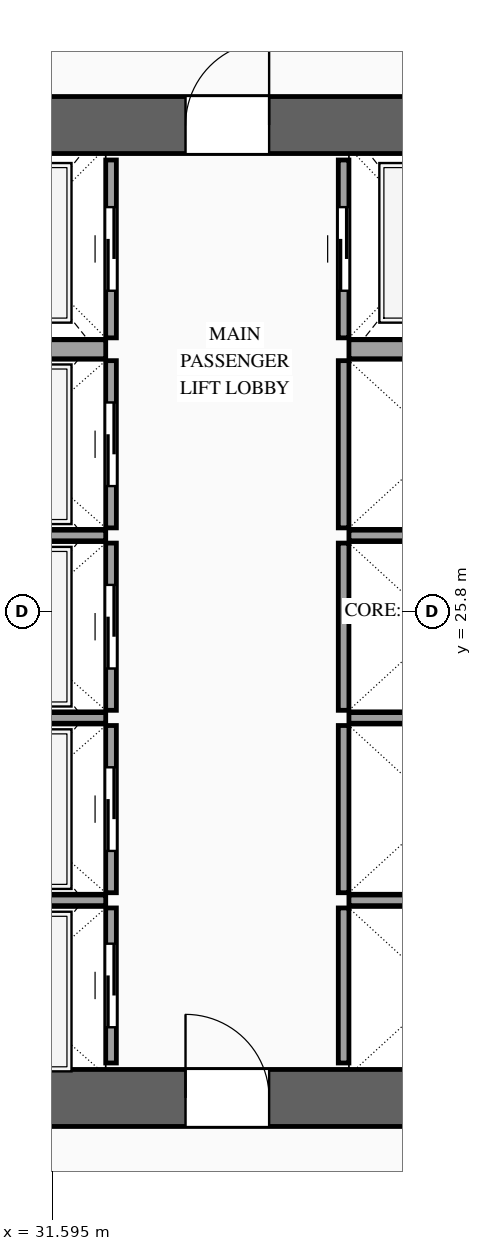
"""IFC4 building model, lengths in metres.
Left out: names, types, materials, properties, quantities, classifications, styles, units other than length and angle.
Written with IfcOpenShell. Run it as: python <this file> out.ifc"""

import sys

from ifc_helpers import new_model, si_unit, direction, frame, frame_2d, origin, place, context, subcontext, project, spatial, rectangle, extrude, source, transform, mapped, element, fill, save


model = new_model("IFC4")
c1 = context("Model", 3, precision=1e-05, world=origin(), true_north=direction((0.0, 1.0)))
c2 = subcontext(c1, "Body", "Model", "MODEL_VIEW")
j1 = project(units=[si_unit("LENGTHUNIT", "METRE"), si_unit("PLANEANGLEUNIT", "RADIAN")], contexts=[c1])
p1 = place(None, origin())
s1 = spatial("IfcSite", under=j1, at=p1, CompositionType="ELEMENT")
p2 = place(p1, origin())
s2 = spatial("IfcBuilding", under=s1, at=p2, CompositionType="ELEMENT")
p3 = place(p2, frame((0.0, 0.0, 129.8)))
s3 = spatial("IfcBuildingStorey", under=s2, at=p3, CompositionType="ELEMENT", Elevation=129.8)
p4 = place(p3, frame((23.425, 19.4, 0.0), z_axis=(0.0, 0.0, 1.0), x_axis=(1.0, 0.0, 0.0)))
e1 = element("IfcWall", 1, at=p4, inside=s3, PredefinedType="SHEAR", context=c2, shape_type="SweptSolid", body=[
    extrude(rectangle(XDim=27.15, YDim=0.75, at=frame_2d((13.575, 0.0))), origin(), (0.0, 0.0, 1.0), 4.6),
])
p5 = place(p4, frame((2.025, 0.0, 0.0)))
e2 = element("IfcOpeningElement", 2, at=p5, cuts=e1, PredefinedType="OPENING", context=c2, shape_type="SweptSolid", body=[
    extrude(rectangle(XDim=1.1, YDim=2.2, at=frame_2d((0.55, 1.1))), frame((0.0, 0.39, 0.0), z_axis=(0.0, -1.0, 0.0), x_axis=(1.0, 0.0, 0.0)), (0.0, 0.0, 1.0), 0.78),
])
p6 = place(p4, frame((9.925, 0.0, 0.0)))
e3 = element("IfcOpeningElement", 3, at=p6, cuts=e1, PredefinedType="OPENING", context=c2, shape_type="SweptSolid", body=[
    extrude(rectangle(XDim=1.1, YDim=2.2, at=frame_2d((0.55, 1.1))), frame((0.0, 0.39, 0.0), z_axis=(0.0, -1.0, 0.0), x_axis=(1.0, 0.0, 0.0)), (0.0, 0.0, 1.0), 0.78),
])
p7 = place(p4, frame((23.125, 0.0, 0.0)))
e4 = element("IfcOpeningElement", 4, at=p7, cuts=e1, PredefinedType="OPENING", context=c2, shape_type="SweptSolid", body=[
    extrude(rectangle(XDim=1.1, YDim=2.2, at=frame_2d((0.55, 1.1))), frame((0.0, 0.39, 0.0), z_axis=(0.0, -1.0, 0.0), x_axis=(1.0, 0.0, 0.0)), (0.0, 0.0, 1.0), 0.78),
])
p8 = place(p4, frame((19.745, 0.0, 0.0)))
e5 = element("IfcOpeningElement", 5, at=p8, cuts=e1, PredefinedType="OPENING", context=c2, shape_type="SweptSolid", body=[
    extrude(rectangle(XDim=0.9, YDim=2.15, at=frame_2d((0.45, 1.075))), frame((0.0, 0.39, 0.0), z_axis=(0.0, -1.0, 0.0), x_axis=(1.0, 0.0, 0.0)), (0.0, 0.0, 1.0), 0.78),
])
p9 = place(p3, frame((23.425, 32.2, 0.0), z_axis=(0.0, 0.0, 1.0), x_axis=(1.0, 0.0, 0.0)))
e6 = element("IfcWall", 6, at=p9, inside=s3, PredefinedType="SHEAR", context=c2, shape_type="SweptSolid", body=[
    extrude(rectangle(XDim=27.15, YDim=0.75, at=frame_2d((13.575, 0.0))), origin(), (0.0, 0.0, 1.0), 4.6),
])
p10 = place(p9, frame((4.645, 0.0, 0.0)))
e7 = element("IfcOpeningElement", 7, at=p10, cuts=e6, PredefinedType="OPENING", context=c2, shape_type="SweptSolid", body=[
    extrude(rectangle(XDim=0.9, YDim=2.15, at=frame_2d((0.45, 1.075))), frame((0.0, 0.39, 0.0), z_axis=(0.0, -1.0, 0.0), x_axis=(1.0, 0.0, 0.0)), (0.0, 0.0, 1.0), 0.78),
])
p11 = place(p9, frame((9.925, 0.0, 0.0)))
e8 = element("IfcOpeningElement", 8, at=p11, cuts=e6, PredefinedType="OPENING", context=c2, shape_type="SweptSolid", body=[
    extrude(rectangle(XDim=1.1, YDim=2.2, at=frame_2d((0.55, 1.1))), frame((0.0, 0.39, 0.0), z_axis=(0.0, -1.0, 0.0), x_axis=(1.0, 0.0, 0.0)), (0.0, 0.0, 1.0), 0.78),
])
p12 = place(p9, frame((15.775, 0.0, 0.0)))
e9 = element("IfcOpeningElement", 9, at=p12, cuts=e6, PredefinedType="OPENING", context=c2, shape_type="SweptSolid", body=[
    extrude(rectangle(XDim=1.1, YDim=2.2, at=frame_2d((0.55, 1.1))), frame((0.0, 0.39, 0.0), z_axis=(0.0, -1.0, 0.0), x_axis=(1.0, 0.0, 0.0)), (0.0, 0.0, 1.0), 0.78),
])
p13 = place(p9, frame((18.975, 0.0, 0.0)))
e10 = element("IfcOpeningElement", 10, at=p13, cuts=e6, PredefinedType="OPENING", context=c2, shape_type="SweptSolid", body=[
    extrude(rectangle(XDim=0.9, YDim=2.15, at=frame_2d((0.45, 1.075))), frame((0.0, 0.39, 0.0), z_axis=(0.0, -1.0, 0.0), x_axis=(1.0, 0.0, 0.0)), (0.0, 0.0, 1.0), 0.78),
])
p14 = place(p3, frame((32.37, 19.86, 0.0), z_axis=(0.0, 0.0, 1.0), x_axis=(0.0, 1.0, 0.0)))
e11 = element("IfcWall", 11, at=p14, inside=s3, PredefinedType="SOLIDWALL", context=c2, shape_type="SweptSolid", body=[
    extrude(rectangle(XDim=2.04, YDim=0.14, at=frame_2d((1.02, 0.0))), origin(), (0.0, 0.0, 1.0), 4.38),
])
p15 = place(p14, frame((0.47, 0.0, 0.0)))
e12 = element("IfcOpeningElement", 12, at=p15, cuts=e11, PredefinedType="OPENING", context=c2, shape_type="SweptSolid", body=[
    extrude(rectangle(XDim=1.1, YDim=2.2, at=frame_2d((0.55, 1.1))), frame((0.0, 0.085, 0.0), z_axis=(0.0, -1.0, 0.0), x_axis=(1.0, 0.0, 0.0)), (0.0, 0.0, 1.0), 0.17),
])
m1 = source(origin(), c2, "Body", "SweptSolid", [
    extrude(rectangle(XDim=2.5, YDim=0.14, at=frame_2d((1.25, 0.0))), origin(), (0.0, 0.0, 1.0), 4.38),
])
p16 = place(p3, frame((29.8, 22.0, 0.0), z_axis=(0.0, 0.0, 1.0), x_axis=(1.0, 0.0, 0.0)))
e13 = element("IfcWall", 13, at=p16, inside=s3, PredefinedType="SOLIDWALL", context=c2, shape_type="MappedRepresentation", body=[
    mapped(m1, transform((0.0, 0.0, 0.0), scale=1.0)),
])
p17 = place(p3, frame((32.37, 22.1, 0.0), z_axis=(0.0, 0.0, 1.0), x_axis=(0.0, 1.0, 0.0)))
e14 = element("IfcWall", 14, at=p17, inside=s3, PredefinedType="SOLIDWALL", context=c2, shape_type="SweptSolid", body=[
    extrude(rectangle(XDim=2.2, YDim=0.14, at=frame_2d((1.1, 0.0))), origin(), (0.0, 0.0, 1.0), 4.38),
])
p18 = place(p17, frame((0.55, 0.0, 0.0)))
e15 = element("IfcOpeningElement", 15, at=p18, cuts=e14, PredefinedType="OPENING", context=c2, shape_type="SweptSolid", body=[
    extrude(rectangle(XDim=1.1, YDim=2.2, at=frame_2d((0.55, 1.1))), frame((0.0, 0.085, 0.0), z_axis=(0.0, -1.0, 0.0), x_axis=(1.0, 0.0, 0.0)), (0.0, 0.0, 1.0), 0.17),
])
p19 = place(p3, frame((29.8, 24.4, 0.0), z_axis=(0.0, 0.0, 1.0), x_axis=(1.0, 0.0, 0.0)))
e16 = element("IfcWall", 16, at=p19, inside=s3, PredefinedType="SOLIDWALL", context=c2, shape_type="MappedRepresentation", body=[
    mapped(m1, transform((0.0, 0.0, 0.0), scale=1.0)),
])
p20 = place(p3, frame((32.37, 24.5, 0.0), z_axis=(0.0, 0.0, 1.0), x_axis=(0.0, 1.0, 0.0)))
e17 = element("IfcWall", 17, at=p20, inside=s3, PredefinedType="SOLIDWALL", context=c2, shape_type="SweptSolid", body=[
    extrude(rectangle(XDim=2.2, YDim=0.14, at=frame_2d((1.1, 0.0))), origin(), (0.0, 0.0, 1.0), 4.38),
])
p21 = place(p20, frame((0.55, 0.0, 0.0)))
e18 = element("IfcOpeningElement", 18, at=p21, cuts=e17, PredefinedType="OPENING", context=c2, shape_type="SweptSolid", body=[
    extrude(rectangle(XDim=1.1, YDim=2.2, at=frame_2d((0.55, 1.1))), frame((0.0, 0.085, 0.0), z_axis=(0.0, -1.0, 0.0), x_axis=(1.0, 0.0, 0.0)), (0.0, 0.0, 1.0), 0.17),
])
p22 = place(p3, frame((29.8, 26.8, 0.0), z_axis=(0.0, 0.0, 1.0), x_axis=(1.0, 0.0, 0.0)))
e19 = element("IfcWall", 19, at=p22, inside=s3, PredefinedType="SOLIDWALL", context=c2, shape_type="MappedRepresentation", body=[
    mapped(m1, transform((0.0, 0.0, 0.0), scale=1.0)),
])
p23 = place(p3, frame((32.37, 26.9, 0.0), z_axis=(0.0, 0.0, 1.0), x_axis=(0.0, 1.0, 0.0)))
e20 = element("IfcWall", 20, at=p23, inside=s3, PredefinedType="SOLIDWALL", context=c2, shape_type="SweptSolid", body=[
    extrude(rectangle(XDim=2.2, YDim=0.14, at=frame_2d((1.1, 0.0))), origin(), (0.0, 0.0, 1.0), 4.38),
])
p24 = place(p23, frame((0.55, 0.0, 0.0)))
e21 = element("IfcOpeningElement", 21, at=p24, cuts=e20, PredefinedType="OPENING", context=c2, shape_type="SweptSolid", body=[
    extrude(rectangle(XDim=1.1, YDim=2.2, at=frame_2d((0.55, 1.1))), frame((0.0, 0.085, 0.0), z_axis=(0.0, -1.0, 0.0), x_axis=(1.0, 0.0, 0.0)), (0.0, 0.0, 1.0), 0.17),
])
p25 = place(p3, frame((32.37, 29.4, 0.0), z_axis=(0.0, 0.0, 1.0), x_axis=(0.0, 1.0, 0.0)))
e22 = element("IfcWall", 22, at=p25, inside=s3, PredefinedType="SOLIDWALL", context=c2, shape_type="SweptSolid", body=[
    extrude(rectangle(XDim=2.34, YDim=0.14, at=frame_2d((1.17, 0.0))), origin(), (0.0, 0.0, 1.0), 4.38),
])
p26 = place(p25, frame((0.62, 0.0, 0.0)))
e23 = element("IfcOpeningElement", 23, at=p26, cuts=e22, PredefinedType="OPENING", context=c2, shape_type="SweptSolid", body=[
    extrude(rectangle(XDim=1.1, YDim=2.2, at=frame_2d((0.55, 1.1))), frame((0.0, 0.085, 0.0), z_axis=(0.0, -1.0, 0.0), x_axis=(1.0, 0.0, 0.0)), (0.0, 0.0, 1.0), 0.17),
])
m2 = source(origin(), c2, "Body", "SweptSolid", [
    extrude(rectangle(XDim=2.5, YDim=0.25, at=frame_2d((1.25, 0.0))), origin(), (0.0, 0.0, 1.0), 4.38),
])
p27 = place(p3, frame((29.8, 29.25, 0.0), z_axis=(0.0, 0.0, 1.0), x_axis=(1.0, 0.0, 0.0)))
e24 = element("IfcWall", 24, at=p27, inside=s3, PredefinedType="SOLIDWALL", context=c2, shape_type="MappedRepresentation", body=[
    mapped(m2, transform((0.0, 0.0, 0.0), scale=1.0)),
])
m3 = source(origin(), c2, "Body", "SweptSolid", [
    extrude(rectangle(XDim=2.04, YDim=0.14, at=frame_2d((1.02, 0.0))), origin(), (0.0, 0.0, 1.0), 4.38),
])
p28 = place(p3, frame((35.43, 19.86, 0.0), z_axis=(0.0, 0.0, 1.0), x_axis=(0.0, 1.0, 0.0)))
e25 = element("IfcWall", 25, at=p28, inside=s3, PredefinedType="SOLIDWALL", context=c2, shape_type="MappedRepresentation", body=[
    mapped(m3, transform((0.0, 0.0, 0.0), scale=1.0)),
])
m4 = source(origin(), c2, "Body", "SweptSolid", [
    extrude(rectangle(XDim=2.4, YDim=0.14, at=frame_2d((1.2, 0.0))), origin(), (0.0, 0.0, 1.0), 4.38),
])
p29 = place(p3, frame((35.5, 22.0, 0.0), z_axis=(0.0, 0.0, 1.0), x_axis=(1.0, 0.0, 0.0)))
e26 = element("IfcWall", 26, at=p29, inside=s3, PredefinedType="SOLIDWALL", context=c2, shape_type="MappedRepresentation", body=[
    mapped(m4, transform((0.0, 0.0, 0.0), scale=1.0)),
])
m5 = source(origin(), c2, "Body", "SweptSolid", [
    extrude(rectangle(XDim=2.2, YDim=0.14, at=frame_2d((1.1, 0.0))), origin(), (0.0, 0.0, 1.0), 4.38),
])
p30 = place(p3, frame((35.43, 22.1, 0.0), z_axis=(0.0, 0.0, 1.0), x_axis=(0.0, 1.0, 0.0)))
e27 = element("IfcWall", 27, at=p30, inside=s3, PredefinedType="SOLIDWALL", context=c2, shape_type="MappedRepresentation", body=[
    mapped(m5, transform((0.0, 0.0, 0.0), scale=1.0)),
])
p31 = place(p3, frame((35.5, 24.4, 0.0), z_axis=(0.0, 0.0, 1.0), x_axis=(1.0, 0.0, 0.0)))
e28 = element("IfcWall", 28, at=p31, inside=s3, PredefinedType="SOLIDWALL", context=c2, shape_type="MappedRepresentation", body=[
    mapped(m4, transform((0.0, 0.0, 0.0), scale=1.0)),
])
p32 = place(p3, frame((35.43, 24.5, 0.0), z_axis=(0.0, 0.0, 1.0), x_axis=(0.0, 1.0, 0.0)))
e29 = element("IfcWall", 29, at=p32, inside=s3, PredefinedType="SOLIDWALL", context=c2, shape_type="MappedRepresentation", body=[
    mapped(m5, transform((0.0, 0.0, 0.0), scale=1.0)),
])
p33 = place(p3, frame((35.5, 26.8, 0.0), z_axis=(0.0, 0.0, 1.0), x_axis=(1.0, 0.0, 0.0)))
e30 = element("IfcWall", 30, at=p33, inside=s3, PredefinedType="SOLIDWALL", context=c2, shape_type="MappedRepresentation", body=[
    mapped(m4, transform((0.0, 0.0, 0.0), scale=1.0)),
])
m6 = source(origin(), c2, "Body", "SweptSolid", [
    extrude(rectangle(XDim=2.2, YDim=0.14, at=frame_2d((1.1, 0.0))), origin(), (0.0, 0.0, 1.0), 4.38),
])
p34 = place(p3, frame((35.43, 26.9, 0.0), z_axis=(0.0, 0.0, 1.0), x_axis=(0.0, 1.0, 0.0)))
e31 = element("IfcWall", 31, at=p34, inside=s3, PredefinedType="SOLIDWALL", context=c2, shape_type="MappedRepresentation", body=[
    mapped(m6, transform((0.0, 0.0, 0.0), scale=1.0)),
])
p35 = place(p3, frame((35.43, 29.4, 0.0), z_axis=(0.0, 0.0, 1.0), x_axis=(0.0, 1.0, 0.0)))
e32 = element("IfcWall", 32, at=p35, inside=s3, PredefinedType="SOLIDWALL", context=c2, shape_type="SweptSolid", body=[
    extrude(rectangle(XDim=2.34, YDim=0.14, at=frame_2d((1.17, 0.0))), origin(), (0.0, 0.0, 1.0), 4.38),
])
p36 = place(p35, frame((0.62, 0.0, 0.0)))
e33 = element("IfcOpeningElement", 33, at=p36, cuts=e32, PredefinedType="OPENING", context=c2, shape_type="SweptSolid", body=[
    extrude(rectangle(XDim=1.1, YDim=2.2, at=frame_2d((0.55, 1.1))), frame((0.0, 0.085, 0.0), z_axis=(0.0, -1.0, 0.0), x_axis=(1.0, 0.0, 0.0)), (0.0, 0.0, 1.0), 0.17),
])
m7 = source(origin(), c2, "Body", "SweptSolid", [
    extrude(rectangle(XDim=2.4, YDim=0.25, at=frame_2d((1.2, 0.0))), origin(), (0.0, 0.0, 1.0), 4.38),
])
p37 = place(p3, frame((35.5, 29.25, 0.0), z_axis=(0.0, 0.0, 1.0), x_axis=(1.0, 0.0, 0.0)))
e34 = element("IfcWall", 34, at=p37, inside=s3, PredefinedType="SOLIDWALL", context=c2, shape_type="MappedRepresentation", body=[
    mapped(m7, transform((0.0, 0.0, 0.0), scale=1.0)),
])
m8 = source(origin(), c2, "Body", "SweptSolid", [
    extrude(rectangle(XDim=1.1, YDim=2.2, at=frame_2d((0.55, 1.1))), frame((0.0, 0.025, 0.0), z_axis=(0.0, -1.0, 0.0), x_axis=(1.0, 0.0, 0.0)), (0.0, 0.0, 1.0), 0.05),
])
p38 = place(p15, origin())
e35 = element("IfcDoor", 35, at=p38, inside=s3, OperationType="SLIDING_TO_LEFT", PredefinedType="DOOR", context=c2, shape_type="MappedRepresentation", body=[
    mapped(m8, transform((0.0, 0.0, 0.0), scale=1.0)),
])
fill(e12, e35)
p39 = place(p18, origin())
e36 = element("IfcDoor", 36, at=p39, inside=s3, OperationType="SLIDING_TO_RIGHT", PredefinedType="DOOR", context=c2, shape_type="MappedRepresentation", body=[
    mapped(m8, transform((0.0, 0.0, 0.0), scale=1.0)),
])
fill(e15, e36)
p40 = place(p21, origin())
e37 = element("IfcDoor", 37, at=p40, inside=s3, OperationType="SLIDING_TO_LEFT", PredefinedType="DOOR", context=c2, shape_type="MappedRepresentation", body=[
    mapped(m8, transform((0.0, 0.0, 0.0), scale=1.0)),
])
fill(e18, e37)
p41 = place(p24, origin())
e38 = element("IfcDoor", 38, at=p41, inside=s3, OperationType="SLIDING_TO_RIGHT", PredefinedType="DOOR", context=c2, shape_type="MappedRepresentation", body=[
    mapped(m8, transform((0.0, 0.0, 0.0), scale=1.0)),
])
fill(e21, e38)
p42 = place(p26, origin())
e39 = element("IfcDoor", 39, at=p42, inside=s3, OperationType="SLIDING_TO_LEFT", PredefinedType="DOOR", context=c2, shape_type="MappedRepresentation", body=[
    mapped(m8, transform((0.0, 0.0, 0.0), scale=1.0)),
])
fill(e23, e39)
p43 = place(p36, origin())
e40 = element("IfcDoor", 40, at=p43, inside=s3, OperationType="SLIDING_TO_RIGHT", PredefinedType="DOOR", context=c2, shape_type="MappedRepresentation", body=[
    mapped(m8, transform((0.0, 0.0, 0.0), scale=1.0)),
])
fill(e33, e40)
m9 = source(origin(), c2, "Body", "SweptSolid", [
    extrude(rectangle(XDim=1.1, YDim=2.2, at=frame_2d((0.55, 1.1))), frame((0.0, 0.025, 0.0), z_axis=(0.0, -1.0, 0.0), x_axis=(1.0, 0.0, 0.0)), (0.0, 0.0, 1.0), 0.05),
])
p44 = place(p6, origin())
e41 = element("IfcDoor", 41, at=p44, inside=s3, OperationType="SINGLE_SWING_LEFT", PredefinedType="DOOR", context=c2, shape_type="MappedRepresentation", body=[
    mapped(m9, transform((0.0, 0.0, 0.0), scale=1.0)),
])
fill(e3, e41)
p45 = place(p11, origin())
e42 = element("IfcDoor", 42, at=p45, inside=s3, OperationType="SINGLE_SWING_RIGHT", PredefinedType="DOOR", context=c2, shape_type="MappedRepresentation", body=[
    mapped(m9, transform((0.0, 0.0, 0.0), scale=1.0)),
])
fill(e8, e42)
save(model, sys.argv[1])
